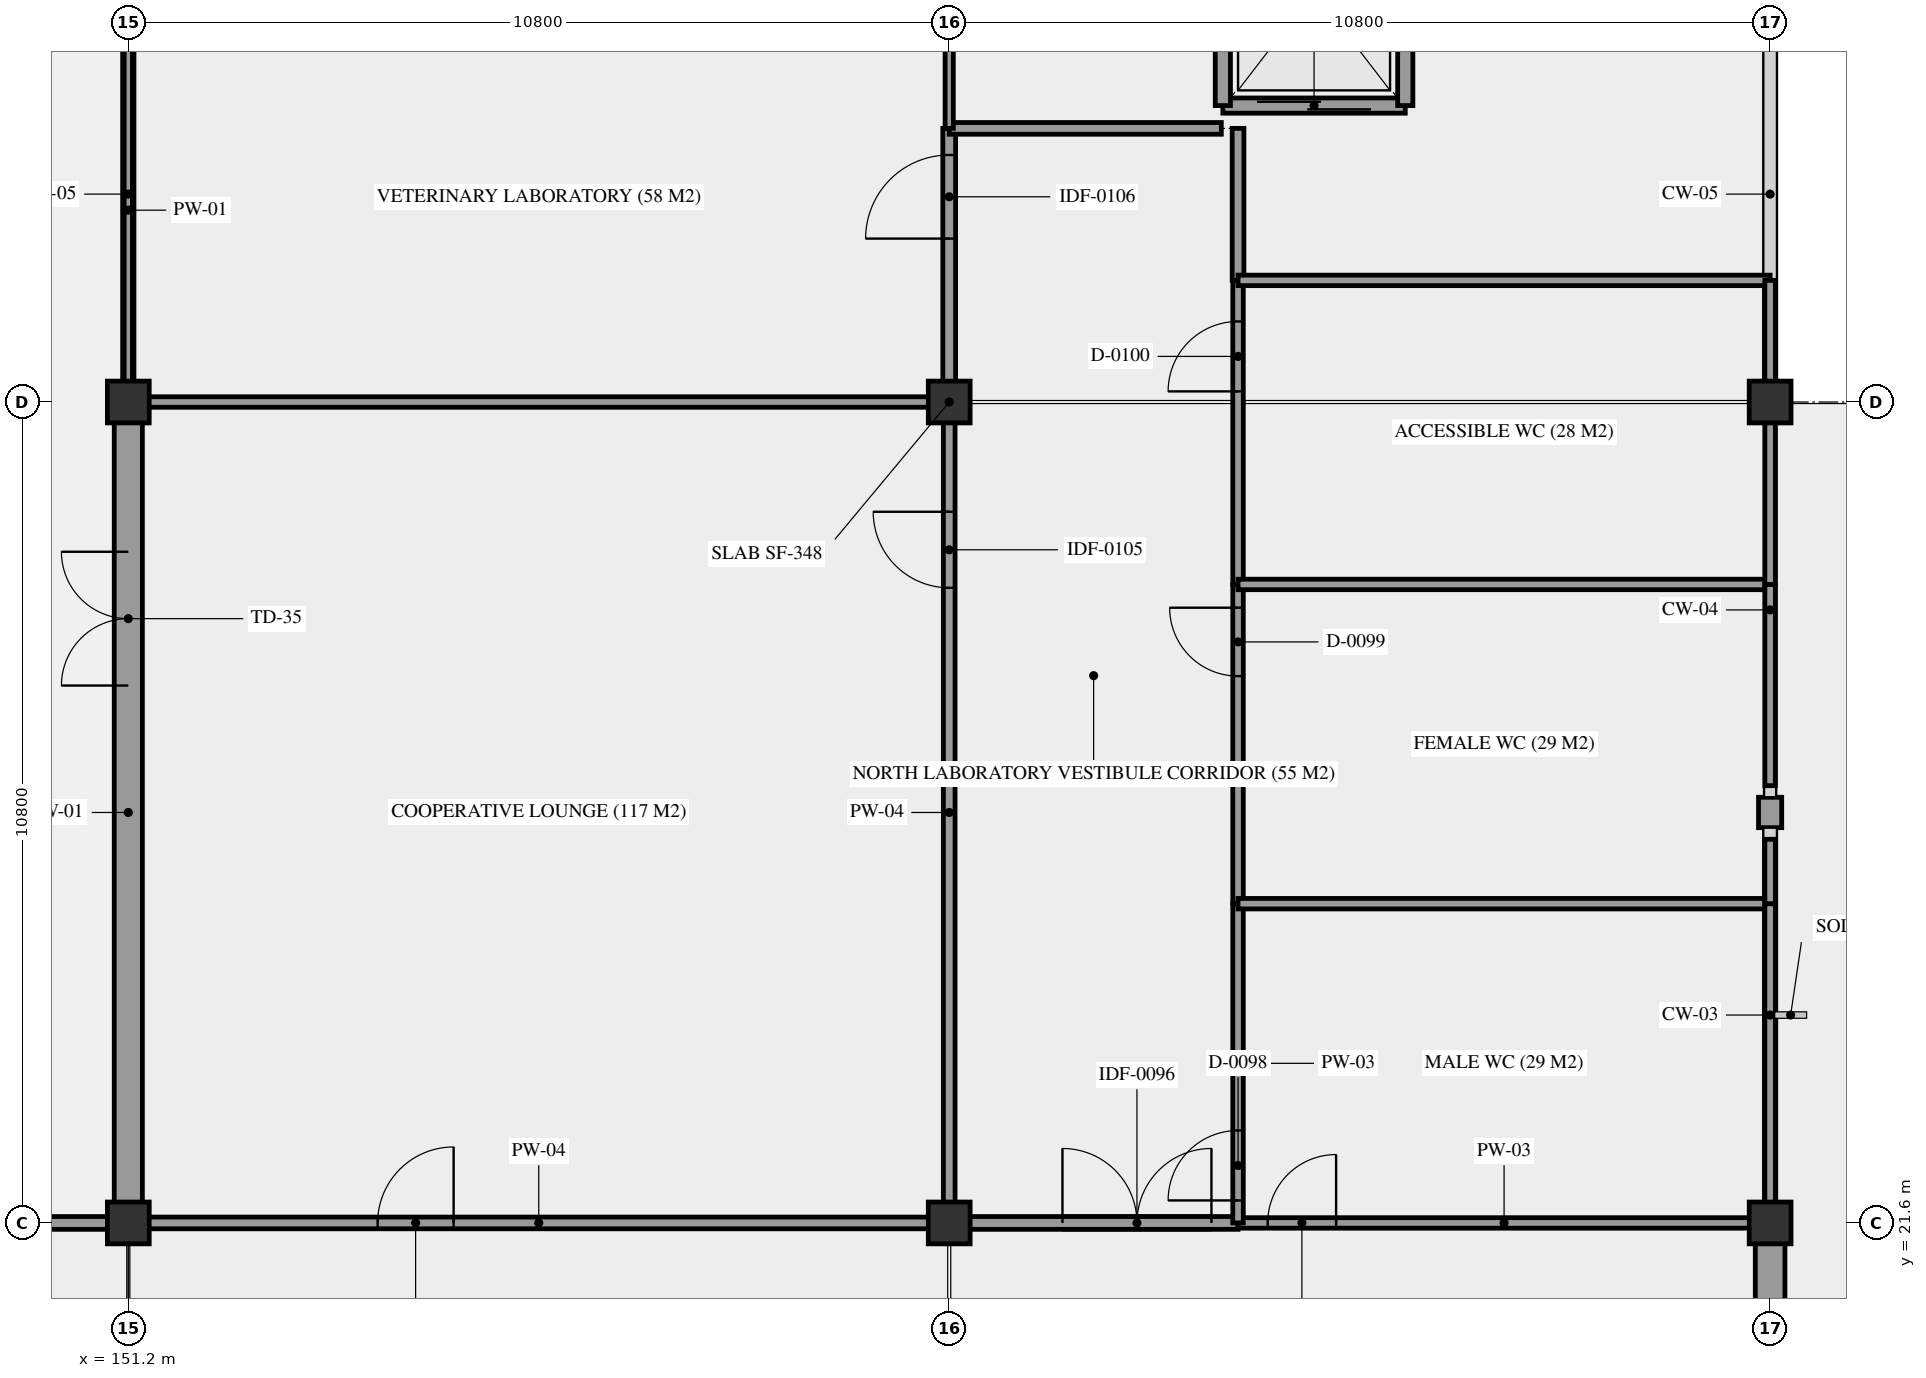
"""IFC4 building model, lengths in metres.
Left out: names, types, materials, properties, quantities, classifications, styles, units other than length and angle.
Written with IfcOpenShell. Run it as: python <this file> out.ifc"""

import sys

from ifc_helpers import new_model, si_unit, direction, frame, frame_2d, origin, origin_2d, place, context, subcontext, project, spatial, rectangle, extrude, element, fill, save


model = new_model("IFC4")
c1 = context("Model", 3, precision=1e-05, world=origin(), true_north=direction((0.0, 1.0)))
c2 = subcontext(c1, "Body", "Model", "MODEL_VIEW")
j1 = project(units=[si_unit("LENGTHUNIT", "METRE"), si_unit("PLANEANGLEUNIT", "RADIAN")], contexts=[c1])
p1 = place(None, origin())
s1 = spatial("IfcSite", under=j1, at=p1, CompositionType="ELEMENT")
p2 = place(p1, origin())
s2 = spatial("IfcBuilding", under=s1, at=p2, CompositionType="ELEMENT")
p3 = place(p2, frame((0.0, 0.0, 14.76)))
s3 = spatial("IfcBuildingStorey", under=s2, at=p3, CompositionType="ELEMENT", Elevation=14.76)
for number, where, z_axis, x_axis in (
    (1, (151.2, 21.6, 0.0), (0.0, 0.0, 1.0), (1.0, 0.0, 0.0)),
    (2, (151.2, 32.4, 0.0), (0.0, 0.0, 1.0), (1.0, 0.0, 0.0)),
    (3, (162.0, 21.6, 0.0), (0.0, 0.0, 1.0), (1.0, 0.0, 0.0)),
    (4, (162.0, 32.4, 0.0), (0.0, 0.0, 1.0), (1.0, 0.0, 0.0)),
    (5, (172.8, 21.6, 0.0), (0.0, 0.0, 1.0), (1.0, 0.0, 0.0)),
    (6, (172.8, 32.4, 0.0), (0.0, 0.0, 1.0), (1.0, 0.0, 0.0)),
):
    element("IfcColumn", number, at=place(p3, frame(where, z_axis=z_axis, x_axis=x_axis)), inside=s3, PredefinedType="COLUMN", context=c2, shape_type="SweptSolid", body=[
        extrude(rectangle(XDim=0.55, YDim=0.55, at=origin_2d()), origin(), (0.0, 0.0, 1.0), 4.32),
    ])
p4 = place(p3, frame((151.2, 21.87, 0.0), z_axis=(0.0, 0.0, 1.0), x_axis=(0.0, 1.0, 0.0)))
e7 = element("IfcWall", 7, at=p4, inside=s3, PredefinedType="STANDARD", context=c2, shape_type="SweptSolid", body=[
    extrude(rectangle(XDim=10.26, YDim=0.37, at=frame_2d((5.13, 0.0))), origin(), (0.0, 0.0, 1.0), 3.17),
])
p5 = place(p4, frame((6.8, 0.0, 0.0)))
e8 = element("IfcOpeningElement", 8, at=p5, cuts=e7, PredefinedType="OPENING", context=c2, shape_type="SweptSolid", body=[
    extrude(rectangle(XDim=1.76, YDim=2.2, at=frame_2d((0.88, 1.1))), frame((0.0, 0.195, 0.0), z_axis=(0.0, -1.0, 0.0), x_axis=(1.0, 0.0, 0.0)), (0.0, 0.0, 1.0), 0.39),
])
p6 = place(p3, frame((172.8, 11.07, 0.0), z_axis=(0.0, 0.0, 1.0), x_axis=(0.0, 1.0, 0.0)))
e9 = element("IfcWall", 9, at=p6, inside=s3, PredefinedType="STANDARD", context=c2, shape_type="SweptSolid", body=[
    extrude(rectangle(XDim=10.26, YDim=0.39, at=frame_2d((5.13, 0.0))), origin(), (0.0, 0.0, 1.0), 3.17),
])
p7 = place(p3, frame((172.8, 26.8, 0.0), z_axis=(0.0, 0.0, 1.0), x_axis=(0.0, 1.0, 0.0)))
e10 = element("IfcWall", 10, at=p7, inside=s3, PredefinedType="STANDARD", context=c2, shape_type="SweptSolid", body=[
    extrude(rectangle(XDim=0.4, YDim=0.305, at=frame_2d((0.2, 0.0))), origin(), (0.0, 0.0, 1.0), 3.17),
])
p8 = place(p3, frame((165.6, 36.3, 0.0), z_axis=(0.0, 0.0, 1.0), x_axis=(1.0, 0.0, 0.0)))
e11 = element("IfcWall", 11, at=p8, inside=s3, PredefinedType="SOLIDWALL", context=c2, shape_type="SweptSolid", body=[
    extrude(rectangle(XDim=2.4, YDim=0.2, at=frame_2d((1.2, 0.0))), origin(), (0.0, 0.0, 1.0), 3.14),
])
p9 = place(p8, frame((0.45, 0.0, 0.0)))
e12 = element("IfcOpeningElement", 12, at=p9, cuts=e11, PredefinedType="OPENING", context=c2, shape_type="SweptSolid", body=[
    extrude(rectangle(XDim=1.5, YDim=2.3, at=frame_2d((0.75, 1.15))), frame((0.0, 0.11, 0.0), z_axis=(0.0, -1.0, 0.0), x_axis=(1.0, 0.0, 0.0)), (0.0, 0.0, 1.0), 0.22),
])
for number, where, z_axis, x_axis in (
    (13, (165.6, 36.3, 0.0), (0.0, 0.0, 1.0), (0.0, 1.0, 0.0)),
    (14, (168.0, 36.3, 0.0), (0.0, 0.0, 1.0), (0.0, 1.0, 0.0)),
):
    element("IfcWall", number, at=place(p3, frame(where, z_axis=z_axis, x_axis=x_axis)), inside=s3, PredefinedType="SOLIDWALL", context=c2, shape_type="SweptSolid", body=[
        extrude(rectangle(XDim=3.0, YDim=0.2, at=frame_2d((1.5, 0.0))), origin(), (0.0, 0.0, 1.0), 3.14),
    ])
p10 = place(p3, frame((162.0, 21.6, 0.0), z_axis=(0.0, 0.0, 1.0), x_axis=(1.0, 0.0, 0.0)))
e15 = element("IfcWall", 15, at=p10, inside=s3, PredefinedType="PARTITIONING", context=c2, shape_type="SweptSolid", body=[
    extrude(rectangle(XDim=3.8, YDim=0.168, at=frame_2d((1.9, 0.0))), origin(), (0.0, 0.0, 1.0), 2.87),
])
p11 = place(p10, frame((1.49, 0.0, 0.0)))
e16 = element("IfcOpeningElement", 16, at=p11, cuts=e15, PredefinedType="OPENING", context=c2, shape_type="SweptSolid", body=[
    extrude(rectangle(XDim=1.96, YDim=2.3, at=frame_2d((0.98, 1.15))), frame((0.0, 0.094, 0.0), z_axis=(0.0, -1.0, 0.0), x_axis=(1.0, 0.0, 0.0)), (0.0, 0.0, 1.0), 0.188),
])
p12 = place(p3, frame((165.8, 21.6, 0.0), z_axis=(0.0, 0.0, 1.0), x_axis=(1.0, 0.0, 0.0)))
e17 = element("IfcWall", 17, at=p12, inside=s3, PredefinedType="PARTITIONING", context=c2, shape_type="SweptSolid", body=[
    extrude(rectangle(XDim=7.0, YDim=0.138, at=frame_2d((3.5, 0.0))), origin(), (0.0, 0.0, 1.0), 2.87),
])
p13 = place(p12, frame((0.39, 0.0, 0.0)))
e18 = element("IfcOpeningElement", 18, at=p13, cuts=e17, PredefinedType="OPENING", context=c2, shape_type="SweptSolid", body=[
    extrude(rectangle(XDim=0.9, YDim=2.1, at=frame_2d((0.45, 1.05))), frame((0.0, 0.079, 0.0), z_axis=(0.0, -1.0, 0.0), x_axis=(1.0, 0.0, 0.0)), (0.0, 0.0, 1.0), 0.158),
])
p14 = place(p3, frame((165.8, 21.6, 0.0), z_axis=(0.0, 0.0, 1.0), x_axis=(0.0, 1.0, 0.0)))
e19 = element("IfcWall", 19, at=p14, inside=s3, PredefinedType="PARTITIONING", context=c2, shape_type="SweptSolid", body=[
    extrude(rectangle(XDim=4.2, YDim=0.138, at=frame_2d((2.1, 0.0))), origin(), (0.0, 0.0, 1.0), 2.87),
])
p15 = place(p14, frame((0.296, 0.0, 0.0)))
e20 = element("IfcOpeningElement", 20, at=p15, cuts=e19, PredefinedType="OPENING", context=c2, shape_type="SweptSolid", body=[
    extrude(rectangle(XDim=0.92, YDim=2.14, at=frame_2d((0.46, 1.07))), frame((0.0, 0.079, 0.0), z_axis=(0.0, -1.0, 0.0), x_axis=(1.0, 0.0, 0.0)), (0.0, 0.0, 1.0), 0.158),
])
p16 = place(p3, frame((165.8, 25.8, 0.0), z_axis=(0.0, 0.0, 1.0), x_axis=(0.0, 1.0, 0.0)))
e21 = element("IfcWall", 21, at=p16, inside=s3, PredefinedType="PARTITIONING", context=c2, shape_type="SweptSolid", body=[
    extrude(rectangle(XDim=4.2, YDim=0.138, at=frame_2d((2.1, 0.0))), origin(), (0.0, 0.0, 1.0), 2.87),
])
p17 = place(p16, frame((2.994, 0.0, 0.0)))
e22 = element("IfcOpeningElement", 22, at=p17, cuts=e21, PredefinedType="OPENING", context=c2, shape_type="SweptSolid", body=[
    extrude(rectangle(XDim=0.9, YDim=2.1, at=frame_2d((0.45, 1.05))), frame((0.0, 0.079, 0.0), z_axis=(0.0, -1.0, 0.0), x_axis=(1.0, 0.0, 0.0)), (0.0, 0.0, 1.0), 0.158),
])
p18 = place(p3, frame((165.8, 30.0, 0.0), z_axis=(0.0, 0.0, 1.0), x_axis=(0.0, 1.0, 0.0)))
e23 = element("IfcWall", 23, at=p18, inside=s3, PredefinedType="PARTITIONING", context=c2, shape_type="SweptSolid", body=[
    extrude(rectangle(XDim=4.0, YDim=0.138, at=frame_2d((2.0, 0.0))), origin(), (0.0, 0.0, 1.0), 2.87),
])
p19 = place(p18, frame((2.54, 0.0, 0.0)))
e24 = element("IfcOpeningElement", 24, at=p19, cuts=e23, PredefinedType="OPENING", context=c2, shape_type="SweptSolid", body=[
    extrude(rectangle(XDim=0.92, YDim=2.14, at=frame_2d((0.46, 1.07))), frame((0.0, 0.079, 0.0), z_axis=(0.0, -1.0, 0.0), x_axis=(1.0, 0.0, 0.0)), (0.0, 0.0, 1.0), 0.158),
])
p20 = place(p3, frame((151.2, 21.6, 0.0), z_axis=(0.0, 0.0, 1.0), x_axis=(1.0, 0.0, 0.0)))
e25 = element("IfcWall", 25, at=p20, inside=s3, PredefinedType="PARTITIONING", context=c2, shape_type="SweptSolid", body=[
    extrude(rectangle(XDim=10.8, YDim=0.154, at=frame_2d((5.4, 0.0))), origin(), (0.0, 0.0, 1.0), 2.87),
])
p21 = place(p20, frame((3.28, 0.0, 0.0)))
e26 = element("IfcOpeningElement", 26, at=p21, cuts=e25, PredefinedType="OPENING", context=c2, shape_type="SweptSolid", body=[
    extrude(rectangle(XDim=1.0, YDim=2.15, at=frame_2d((0.5, 1.075))), frame((0.0, 0.087, 0.0), z_axis=(0.0, -1.0, 0.0), x_axis=(1.0, 0.0, 0.0)), (0.0, 0.0, 1.0), 0.174),
])
p22 = place(p3, frame((162.0, 21.6, 0.0), z_axis=(0.0, 0.0, 1.0), x_axis=(0.0, 1.0, 0.0)))
e27 = element("IfcWall", 27, at=p22, inside=s3, PredefinedType="PARTITIONING", context=c2, shape_type="SweptSolid", body=[
    extrude(rectangle(XDim=10.8, YDim=0.154, at=frame_2d((5.4, 0.0))), origin(), (0.0, 0.0, 1.0), 2.87),
])
p23 = place(p22, frame((8.356, 0.0, 0.0)))
e28 = element("IfcOpeningElement", 28, at=p23, cuts=e27, PredefinedType="OPENING", context=c2, shape_type="SweptSolid", body=[
    extrude(rectangle(XDim=1.0, YDim=2.15, at=frame_2d((0.5, 1.075))), frame((0.0, 0.087, 0.0), z_axis=(0.0, -1.0, 0.0), x_axis=(1.0, 0.0, 0.0)), (0.0, 0.0, 1.0), 0.174),
])
p24 = place(p3, frame((162.0, 32.4, 0.0), z_axis=(0.0, 0.0, 1.0), x_axis=(0.0, 1.0, 0.0)))
e29 = element("IfcWall", 29, at=p24, inside=s3, PredefinedType="PARTITIONING", context=c2, shape_type="SweptSolid", body=[
    extrude(rectangle(XDim=3.6, YDim=0.168, at=frame_2d((1.8, 0.0))), origin(), (0.0, 0.0, 1.0), 2.87),
])
p25 = place(p24, frame((2.15, 0.0, 0.0)))
e30 = element("IfcOpeningElement", 30, at=p25, cuts=e29, PredefinedType="OPENING", context=c2, shape_type="SweptSolid", body=[
    extrude(rectangle(XDim=1.1, YDim=2.2, at=frame_2d((0.55, 1.1))), frame((0.0, 0.094, 0.0), z_axis=(0.0, -1.0, 0.0), x_axis=(1.0, 0.0, 0.0)), (0.0, 0.0, 1.0), 0.188),
])
p26 = place(p3, frame((146.153, 21.6, 0.0), z_axis=(0.0, 0.0, 1.0), x_axis=(1.0, 0.0, 0.0)))
e31 = element("IfcWall", 31, at=p26, inside=s3, PredefinedType="PARTITIONING", context=c2, shape_type="SweptSolid", body=[
    extrude(rectangle(XDim=5.047, YDim=0.168, at=frame_2d((2.524, 0.0))), origin(), (0.0, 0.0, 1.0), 2.87),
])
p27 = place(p3, frame((151.2, 32.4, 0.0), z_axis=(0.0, 0.0, 1.0), x_axis=(1.0, 0.0, 0.0)))
e32 = element("IfcWall", 32, at=p27, inside=s3, PredefinedType="PARTITIONING", context=c2, shape_type="SweptSolid", body=[
    extrude(rectangle(XDim=10.8, YDim=0.138, at=frame_2d((5.4, 0.0))), origin(), (0.0, 0.0, 1.0), 2.87),
])
p28 = place(p3, frame((151.2, 32.4, 0.0), z_axis=(0.0, 0.0, 1.0), x_axis=(0.0, 1.0, 0.0)))
e33 = element("IfcWall", 33, at=p28, inside=s3, PredefinedType="PARTITIONING", context=c2, shape_type="SweptSolid", body=[
    extrude(rectangle(XDim=5.048, YDim=0.108, at=frame_2d((2.524, 0.0))), origin(), (0.0, 0.0, 1.0), 2.87),
])
p29 = place(p3, frame((162.0, 36.0, 0.0), z_axis=(0.0, 0.0, 1.0), x_axis=(1.0, 0.0, 0.0)))
e34 = element("IfcWall", 34, at=p29, inside=s3, PredefinedType="PARTITIONING", context=c2, shape_type="SweptSolid", body=[
    extrude(rectangle(XDim=3.58, YDim=0.154, at=frame_2d((1.79, 0.0))), origin(), (0.0, 0.0, 1.0), 2.87),
])
p30 = place(p3, frame((162.0, 36.0, 0.0), z_axis=(0.0, 0.0, 1.0), x_axis=(0.0, 1.0, 0.0)))
e35 = element("IfcWall", 35, at=p30, inside=s3, PredefinedType="PARTITIONING", context=c2, shape_type="SweptSolid", body=[
    extrude(rectangle(XDim=1.8, YDim=0.108, at=frame_2d((0.9, 0.0))), origin(), (0.0, 0.0, 1.0), 2.87),
])
for number, where, z_axis, x_axis in (
    (36, (165.8, 25.8, 0.0), (0.0, 0.0, 1.0), (1.0, 0.0, 0.0)),
    (37, (165.8, 30.0, 0.0), (0.0, 0.0, 1.0), (1.0, 0.0, 0.0)),
):
    element("IfcWall", number, at=place(p3, frame(where, z_axis=z_axis, x_axis=x_axis)), inside=s3, PredefinedType="PARTITIONING", context=c2, shape_type="SweptSolid", body=[
        extrude(rectangle(XDim=7.0, YDim=0.138, at=frame_2d((3.5, 0.0))), origin(), (0.0, 0.0, 1.0), 2.87),
    ])
p31 = place(p3, frame((165.8, 34.0, 0.0), z_axis=(0.0, 0.0, 1.0), x_axis=(0.0, 1.0, 0.0)))
e38 = element("IfcWall", 38, at=p31, inside=s3, PredefinedType="PARTITIONING", context=c2, shape_type="SweptSolid", body=[
    extrude(rectangle(XDim=2.0, YDim=0.154, at=frame_2d((1.0, 0.0))), origin(), (0.0, 0.0, 1.0), 2.87),
])
p32 = place(p3, frame((165.8, 34.0, 0.0), z_axis=(0.0, 0.0, 1.0), x_axis=(1.0, 0.0, 0.0)))
e39 = element("IfcWall", 39, at=p32, inside=s3, PredefinedType="PARTITIONING", context=c2, shape_type="SweptSolid", body=[
    extrude(rectangle(XDim=7.0, YDim=0.138, at=frame_2d((3.5, 0.0))), origin(), (0.0, 0.0, 1.0), 2.87),
])
p33 = place(p3, frame((172.8, 21.6, 0.0), z_axis=(0.0, 0.0, 1.0), x_axis=(0.0, 1.0, 0.0)))
e40 = element("IfcWall", 40, at=p33, inside=s3, PredefinedType="PARTITIONING", context=c2, shape_type="SweptSolid", body=[
    extrude(rectangle(XDim=4.2, YDim=0.138, at=frame_2d((2.1, 0.0))), origin(), (0.0, 0.0, 1.0), 2.87),
])
p34 = place(p3, frame((172.8, 25.8, 0.0), z_axis=(0.0, 0.0, 1.0), x_axis=(0.0, 1.0, 0.0)))
e41 = element("IfcWall", 41, at=p34, inside=s3, PredefinedType="PARTITIONING", context=c2, shape_type="SweptSolid", body=[
    extrude(rectangle(XDim=0.847, YDim=0.138, at=frame_2d((0.424, 0.0))), origin(), (0.0, 0.0, 1.0), 2.87),
])
p35 = place(p3, frame((172.8, 27.353, 0.0), z_axis=(0.0, 0.0, 1.0), x_axis=(0.0, 1.0, 0.0)))
e42 = element("IfcWall", 42, at=p35, inside=s3, PredefinedType="PARTITIONING", context=c2, shape_type="SweptSolid", body=[
    extrude(rectangle(XDim=2.647, YDim=0.138, at=frame_2d((1.324, 0.0))), origin(), (0.0, 0.0, 1.0), 2.87),
])
p36 = place(p3, frame((172.8, 30.0, 0.0), z_axis=(0.0, 0.0, 1.0), x_axis=(0.0, 1.0, 0.0)))
e43 = element("IfcWall", 43, at=p36, inside=s3, PredefinedType="PARTITIONING", context=c2, shape_type="SweptSolid", body=[
    extrude(rectangle(XDim=4.0, YDim=0.138, at=frame_2d((2.0, 0.0))), origin(), (0.0, 0.0, 1.0), 2.87),
])
p37 = place(p5, origin())
e44 = element("IfcDoor", 44, at=p37, inside=s3, OperationType="DOUBLE_DOOR_SINGLE_SWING", PredefinedType="DOOR", context=c2, shape_type="SweptSolid", body=[
    extrude(rectangle(XDim=1.76, YDim=2.2, at=frame_2d((0.88, 1.1))), frame((0.0, 0.025, 0.0), z_axis=(0.0, -1.0, 0.0), x_axis=(1.0, 0.0, 0.0)), (0.0, 0.0, 1.0), 0.05),
])
fill(e8, e44)
p38 = place(p9, origin())
e45 = element("IfcDoor", 45, at=p38, inside=s3, OperationType="DOUBLE_DOOR_SLIDING", PredefinedType="DOOR", context=c2, shape_type="SweptSolid", body=[
    extrude(rectangle(XDim=1.5, YDim=2.3, at=frame_2d((0.75, 1.15))), frame((0.0, 0.025, 0.0), z_axis=(0.0, -1.0, 0.0), x_axis=(1.0, 0.0, 0.0)), (0.0, 0.0, 1.0), 0.05),
])
fill(e12, e45)
p39 = place(p11, frame((1.96, 0.0, 0.0), z_axis=(0.0, 0.0, 1.0), x_axis=(-1.0, 0.0, 0.0)))
e46 = element("IfcDoor", 46, at=p39, inside=s3, OperationType="DOUBLE_DOOR_SINGLE_SWING", PredefinedType="DOOR", context=c2, shape_type="SweptSolid", body=[
    extrude(rectangle(XDim=1.96, YDim=2.3, at=frame_2d((0.98, 1.15))), frame((0.0, 0.025, 0.0), z_axis=(0.0, -1.0, 0.0), x_axis=(1.0, 0.0, 0.0)), (0.0, 0.0, 1.0), 0.05),
])
fill(e16, e46)
p40 = place(p13, origin())
e47 = element("IfcDoor", 47, at=p40, inside=s3, OperationType="SINGLE_SWING_RIGHT", PredefinedType="DOOR", context=c2, shape_type="SweptSolid", body=[
    extrude(rectangle(XDim=0.9, YDim=2.1, at=frame_2d((0.45, 1.05))), frame((0.0, 0.025, 0.0), z_axis=(0.0, -1.0, 0.0), x_axis=(1.0, 0.0, 0.0)), (0.0, 0.0, 1.0), 0.05),
])
fill(e18, e47)
p41 = place(p15, origin())
e48 = element("IfcDoor", 48, at=p41, inside=s3, OperationType="SINGLE_SWING_LEFT", PredefinedType="DOOR", context=c2, shape_type="SweptSolid", body=[
    extrude(rectangle(XDim=0.92, YDim=2.14, at=frame_2d((0.46, 1.07))), frame((0.0, 0.025, 0.0), z_axis=(0.0, -1.0, 0.0), x_axis=(1.0, 0.0, 0.0)), (0.0, 0.0, 1.0), 0.05),
])
fill(e20, e48)
p42 = place(p17, frame((0.9, 0.0, 0.0), z_axis=(0.0, 0.0, 1.0), x_axis=(-1.0, 0.0, 0.0)))
e49 = element("IfcDoor", 49, at=p42, inside=s3, OperationType="SINGLE_SWING_RIGHT", PredefinedType="DOOR", context=c2, shape_type="SweptSolid", body=[
    extrude(rectangle(XDim=0.9, YDim=2.1, at=frame_2d((0.45, 1.05))), frame((0.0, 0.025, 0.0), z_axis=(0.0, -1.0, 0.0), x_axis=(1.0, 0.0, 0.0)), (0.0, 0.0, 1.0), 0.05),
])
fill(e22, e49)
p43 = place(p19, origin())
e50 = element("IfcDoor", 50, at=p43, inside=s3, OperationType="SINGLE_SWING_LEFT", PredefinedType="DOOR", context=c2, shape_type="SweptSolid", body=[
    extrude(rectangle(XDim=0.92, YDim=2.14, at=frame_2d((0.46, 1.07))), frame((0.0, 0.025, 0.0), z_axis=(0.0, -1.0, 0.0), x_axis=(1.0, 0.0, 0.0)), (0.0, 0.0, 1.0), 0.05),
])
fill(e24, e50)
p44 = place(p21, origin())
e51 = element("IfcDoor", 51, at=p44, inside=s3, OperationType="SINGLE_SWING_RIGHT", PredefinedType="DOOR", context=c2, shape_type="SweptSolid", body=[
    extrude(rectangle(XDim=1.0, YDim=2.15, at=frame_2d((0.5, 1.075))), frame((0.0, 0.025, 0.0), z_axis=(0.0, -1.0, 0.0), x_axis=(1.0, 0.0, 0.0)), (0.0, 0.0, 1.0), 0.05),
])
fill(e26, e51)
p45 = place(p23, frame((1.0, 0.0, 0.0), z_axis=(0.0, 0.0, 1.0), x_axis=(-1.0, 0.0, 0.0)))
e52 = element("IfcDoor", 52, at=p45, inside=s3, OperationType="SINGLE_SWING_RIGHT", PredefinedType="DOOR", context=c2, shape_type="SweptSolid", body=[
    extrude(rectangle(XDim=1.0, YDim=2.15, at=frame_2d((0.5, 1.075))), frame((0.0, 0.025, 0.0), z_axis=(0.0, -1.0, 0.0), x_axis=(1.0, 0.0, 0.0)), (0.0, 0.0, 1.0), 0.05),
])
fill(e28, e52)
p46 = place(p25, origin())
e53 = element("IfcDoor", 53, at=p46, inside=s3, OperationType="SINGLE_SWING_LEFT", PredefinedType="DOOR", context=c2, shape_type="SweptSolid", body=[
    extrude(rectangle(XDim=1.1, YDim=2.2, at=frame_2d((0.55, 1.1))), frame((0.0, 0.025, 0.0), z_axis=(0.0, -1.0, 0.0), x_axis=(1.0, 0.0, 0.0)), (0.0, 0.0, 1.0), 0.05),
])
fill(e30, e53)
save(model, sys.argv[1])
